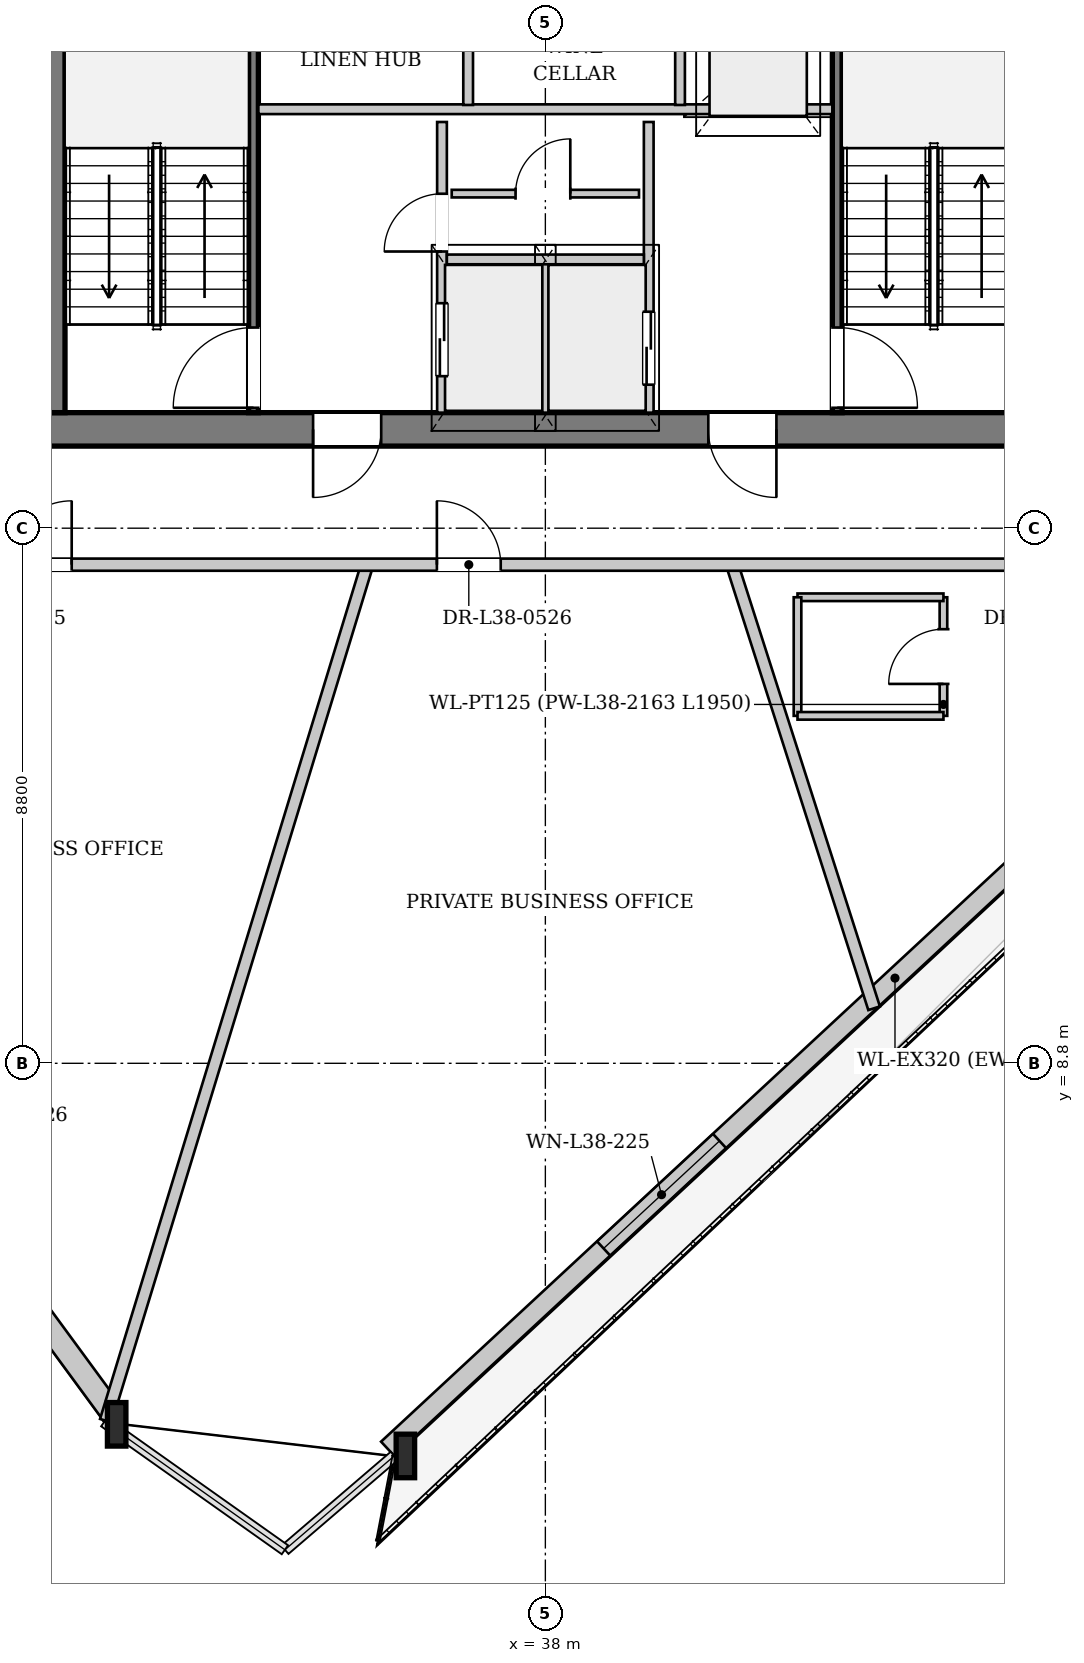
"""IFC4 building model, lengths in metres.
Left out: names, types, materials, properties, quantities, classifications, styles, units other than length and angle.
Written with IfcOpenShell. Run it as: python <this file> out.ifc"""

import sys

from ifc_helpers import new_model, si_unit, direction, frame, frame_2d, origin, origin_2d, place, context, subcontext, project, spatial, rectangle, i_section, extrude, source, transform, mapped, element, fill, save


model = new_model("IFC4")
c1 = context("Model", 3, precision=1e-05, world=origin(), true_north=direction((0.0, 1.0)))
c2 = subcontext(c1, "Body", "Model", "MODEL_VIEW")
j1 = project(units=[si_unit("LENGTHUNIT", "METRE"), si_unit("PLANEANGLEUNIT", "RADIAN")], contexts=[c1])
p1 = place(None, origin())
s1 = spatial("IfcSite", under=j1, at=p1, CompositionType="ELEMENT")
p2 = place(p1, origin())
s2 = spatial("IfcBuilding", under=s1, at=p2, CompositionType="ELEMENT")
p3 = place(p2, frame((0.0, 0.0, 146.6)))
s3 = spatial("IfcBuildingStorey", under=s2, at=p3, CompositionType="ELEMENT", Elevation=146.6)
m1 = source(origin(), c2, "Body", "SweptSolid", [
    extrude(i_section(OverallWidth=0.304, OverallDepth=0.716, WebThickness=0.021, FlangeThickness=0.04, at=origin_2d()), origin(), (0.0, 0.0, 1.0), 3.41),
])
p4 = place(p3, frame((30.746, 2.904, 0.0), z_axis=(0.119337187933, -0.023838802389, 0.992567552904), x_axis=(0.195889876884, 0.980625900196, 0.0)))
e1 = element("IfcColumn", 1, at=p4, inside=s3, PredefinedType="COLUMN", context=c2, shape_type="MappedRepresentation", body=[
    mapped(m1, transform((0.0, 0.0, 0.0), x_axis=(1.0, 0.0, 0.0), y_axis=(0.0, 1.0, 0.0), z_axis=(0.0, 0.0, 1.0), scale=1.0)),
])
m2 = source(origin(), c2, "Body", "SweptSolid", [
    extrude(i_section(OverallWidth=0.304, OverallDepth=0.716, WebThickness=0.021, FlangeThickness=0.04, at=origin_2d()), origin(), (0.0, 0.0, 1.0), 3.405),
])
p5 = place(p3, frame((35.516, 2.344, 0.0), z_axis=(0.107062289558, -0.000286838016, 0.994252273761), x_axis=(0.002679159842, 0.999996411045, 0.0)))
e2 = element("IfcColumn", 2, at=p5, inside=s3, PredefinedType="COLUMN", context=c2, shape_type="MappedRepresentation", body=[
    mapped(m2, transform((0.0, 0.0, 0.0), x_axis=(1.0, 0.0, 0.0), y_axis=(0.0, 1.0, 0.0), z_axis=(0.0, 0.0, 1.0), scale=1.0)),
])
p6 = place(p3, frame((52.73, 18.532, 0.0), z_axis=(0.0, 0.0, 1.0), x_axis=(-0.73309626957, -0.680124885255, 0.0)))
e3 = element("IfcWall", 3, at=p6, inside=s3, PredefinedType="SOLIDWALL", context=c2, shape_type="SweptSolid", body=[
    extrude(rectangle(XDim=23.63, YDim=0.32, at=frame_2d((11.815, 0.0))), origin(), (0.0, 0.0, 1.0), 2.692),
])
p7 = place(p6, frame((6.812, 0.0, 0.0)))
e4 = element("IfcOpeningElement", 4, at=p7, cuts=e3, PredefinedType="OPENING", context=c2, shape_type="SweptSolid", body=[
    extrude(rectangle(XDim=1.5, YDim=2.3, at=frame_2d((0.75, 1.15))), frame((0.0, 0.17, 0.0), z_axis=(0.0, -1.0, 0.0), x_axis=(1.0, 0.0, 0.0)), (0.0, 0.0, 1.0), 0.34),
])
p8 = place(p6, frame((16.186, 0.0, 0.25)))
e5 = element("IfcOpeningElement", 5, at=p8, cuts=e3, PredefinedType="OPENING", context=c2, shape_type="SweptSolid", body=[
    extrude(rectangle(XDim=2.6, YDim=2.35, at=frame_2d((1.3, 1.175))), frame((0.0, 0.17, 0.0), z_axis=(0.0, -1.0, 0.0), x_axis=(1.0, 0.0, 0.0)), (0.0, 0.0, 1.0), 0.34),
])
p9 = place(p3, frame((30.899, 3.016, 0.0), z_axis=(0.0, 0.0, 1.0), x_axis=(-0.591609379136, 0.806224746903, 0.0)))
e6 = element("IfcWall", 6, at=p9, inside=s3, PredefinedType="SOLIDWALL", context=c2, shape_type="SweptSolid", body=[
    extrude(rectangle(XDim=18.003, YDim=0.38, at=frame_2d((9.001, 0.0))), origin(), (0.0, 0.0, 1.0), 2.692),
])
p10 = place(p9, frame((3.941, 0.0, 0.322)))
e7 = element("IfcOpeningElement", 7, at=p10, cuts=e6, PredefinedType="OPENING", context=c2, shape_type="SweptSolid", body=[
    extrude(rectangle(XDim=2.2, YDim=2.25, at=frame_2d((1.1, 1.125))), frame((0.0, 0.2, 0.0), z_axis=(0.0, -1.0, 0.0), x_axis=(1.0, 0.0, 0.0)), (0.0, 0.0, 1.0), 0.4),
])
p11 = place(p9, frame((10.762, 0.0, 0.322)))
e8 = element("IfcOpeningElement", 8, at=p11, cuts=e6, PredefinedType="OPENING", context=c2, shape_type="SweptSolid", body=[
    extrude(rectangle(XDim=2.2, YDim=2.25, at=frame_2d((1.1, 1.125))), frame((0.0, 0.2, 0.0), z_axis=(0.0, -1.0, 0.0), x_axis=(1.0, 0.0, 0.0)), (0.0, 0.0, 1.0), 0.4),
])
p12 = place(p3, frame((46.45, 19.225, 0.0), z_axis=(0.0, 0.0, 1.0), x_axis=(-1.0, 0.0, 0.0)))
e9 = element("IfcWall", 9, at=p12, inside=s3, PredefinedType="SHEAR", context=c2, shape_type="SweptSolid", body=[
    extrude(rectangle(XDim=16.9, YDim=0.55, at=frame_2d((8.45, 0.0))), origin(), (0.0, 0.0, 1.0), 3.3),
])
p13 = place(p12, frame((4.65, 0.0, 0.0)))
e10 = element("IfcOpeningElement", 10, at=p13, cuts=e9, PredefinedType="OPENING", context=c2, shape_type="SweptSolid", body=[
    extrude(rectangle(XDim=1.12, YDim=2.25, at=frame_2d((0.56, 1.125))), frame((0.0, 0.285, 0.0), z_axis=(0.0, -1.0, 0.0), x_axis=(1.0, 0.0, 0.0)), (0.0, 0.0, 1.0), 0.57),
])
p14 = place(p12, frame((11.15, 0.0, 0.0)))
e11 = element("IfcOpeningElement", 11, at=p14, cuts=e9, PredefinedType="OPENING", context=c2, shape_type="SweptSolid", body=[
    extrude(rectangle(XDim=1.12, YDim=2.25, at=frame_2d((0.56, 1.125))), frame((0.0, 0.285, 0.0), z_axis=(0.0, -1.0, 0.0), x_axis=(1.0, 0.0, 0.0)), (0.0, 0.0, 1.0), 0.57),
])
p15 = place(p3, frame((29.825, 19.5, 0.0), z_axis=(0.0, 0.0, 1.0), x_axis=(0.0, 1.0, 0.0)))
e12 = element("IfcWall", 12, at=p15, inside=s3, PredefinedType="SHEAR", context=c2, shape_type="SweptSolid", body=[
    extrude(rectangle(XDim=14.2, YDim=0.55, at=frame_2d((7.1, 0.0))), origin(), (0.0, 0.0, 1.0), 3.3),
])
p16 = place(p15, frame((7.42, 0.0, 0.0)))
e13 = element("IfcOpeningElement", 13, at=p16, cuts=e12, PredefinedType="OPENING", context=c2, shape_type="SweptSolid", body=[
    extrude(rectangle(XDim=1.6, YDim=2.2, at=frame_2d((0.8, 1.1))), frame((0.0, 0.285, 0.0), z_axis=(0.0, -1.0, 0.0), x_axis=(1.0, 0.0, 0.0)), (0.0, 0.0, 1.0), 0.57),
])
p17 = place(p3, frame((33.2, 19.5, 0.0), z_axis=(0.0, 0.0, 1.0), x_axis=(0.0, 1.0, 0.0)))
e14 = element("IfcWall", 14, at=p17, inside=s3, PredefinedType="PARTITIONING", context=c2, shape_type="SweptSolid", body=[
    extrude(rectangle(XDim=7.46, YDim=0.16, at=frame_2d((3.73, 0.0))), origin(), (0.0, 0.0, 1.0), 3.3),
])
p18 = place(p17, frame((0.08, 0.0, 0.0)))
e15 = element("IfcOpeningElement", 15, at=p18, cuts=e14, PredefinedType="OPENING", context=c2, shape_type="SweptSolid", body=[
    extrude(rectangle(XDim=1.32, YDim=2.2, at=frame_2d((0.66, 1.1))), frame((0.0, 0.09, 0.0), z_axis=(0.0, -1.0, 0.0), x_axis=(1.0, 0.0, 0.0)), (0.0, 0.0, 1.0), 0.18),
])
p19 = place(p3, frame((42.8, 26.96, 0.0), z_axis=(0.0, 0.0, 1.0), x_axis=(0.0, -1.0, 0.0)))
e16 = element("IfcWall", 16, at=p19, inside=s3, PredefinedType="PARTITIONING", context=c2, shape_type="SweptSolid", body=[
    extrude(rectangle(XDim=7.46, YDim=0.16, at=frame_2d((3.73, 0.0))), origin(), (0.0, 0.0, 1.0), 3.3),
])
p20 = place(p19, frame((6.06, 0.0, 0.0)))
e17 = element("IfcOpeningElement", 17, at=p20, cuts=e16, PredefinedType="OPENING", context=c2, shape_type="SweptSolid", body=[
    extrude(rectangle(XDim=1.32, YDim=2.2, at=frame_2d((0.66, 1.1))), frame((0.0, 0.09, 0.0), z_axis=(0.0, -1.0, 0.0), x_axis=(1.0, 0.0, 0.0)), (0.0, 0.0, 1.0), 0.18),
])
p21 = place(p3, frame((36.3, 19.5, 0.0), z_axis=(0.0, 0.0, 1.0), x_axis=(0.0, 1.0, 0.0)))
e18 = element("IfcWall", 18, at=p21, inside=s3, PredefinedType="PARTITIONING", context=c2, shape_type="SweptSolid", body=[
    extrude(rectangle(XDim=4.78, YDim=0.16, at=frame_2d((2.39, 0.0))), origin(), (0.0, 0.0, 1.0), 3.3),
])
p22 = place(p21, frame((0.6, 0.0, 0.0)))
e19 = element("IfcOpeningElement", 19, at=p22, cuts=e18, PredefinedType="OPENING", context=c2, shape_type="SweptSolid", body=[
    extrude(rectangle(XDim=1.2, YDim=2.2, at=frame_2d((0.6, 1.1))), frame((0.0, 0.09, 0.0), z_axis=(0.0, -1.0, 0.0), x_axis=(1.0, 0.0, 0.0)), (0.0, 0.0, 1.0), 0.18),
])
p23 = place(p21, frame((2.65, 0.0, 0.0)))
e20 = element("IfcOpeningElement", 20, at=p23, cuts=e18, PredefinedType="OPENING", context=c2, shape_type="SweptSolid", body=[
    extrude(rectangle(XDim=0.95, YDim=2.1, at=frame_2d((0.475, 1.05))), frame((0.0, 0.09, 0.0), z_axis=(0.0, -1.0, 0.0), x_axis=(1.0, 0.0, 0.0)), (0.0, 0.0, 1.0), 0.18),
])
p24 = place(p3, frame((39.7, 24.28, 0.0), z_axis=(0.0, 0.0, 1.0), x_axis=(0.0, -1.0, 0.0)))
e21 = element("IfcWall", 21, at=p24, inside=s3, PredefinedType="PARTITIONING", context=c2, shape_type="SweptSolid", body=[
    extrude(rectangle(XDim=4.78, YDim=0.16, at=frame_2d((2.39, 0.0))), origin(), (0.0, 0.0, 1.0), 3.3),
])
p25 = place(p24, frame((3.12, 0.0, 0.0)))
e22 = element("IfcOpeningElement", 22, at=p25, cuts=e21, PredefinedType="OPENING", context=c2, shape_type="SweptSolid", body=[
    extrude(rectangle(XDim=1.2, YDim=2.2, at=frame_2d((0.6, 1.1))), frame((0.0, 0.09, 0.0), z_axis=(0.0, -1.0, 0.0), x_axis=(1.0, 0.0, 0.0)), (0.0, 0.0, 1.0), 0.18),
])
p26 = place(p3, frame((38.0, 19.5, 0.0), z_axis=(0.0, 0.0, 1.0), x_axis=(0.0, 1.0, 0.0)))
e23 = element("IfcWall", 23, at=p26, inside=s3, PredefinedType="PARTITIONING", context=c2, shape_type="SweptSolid", body=[
    extrude(rectangle(XDim=2.46, YDim=0.125, at=frame_2d((1.23, 0.0))), origin(), (0.0, 0.0, 1.0), 3.3),
])
p27 = place(p3, frame((36.38, 22.02, 0.0), z_axis=(0.0, 0.0, 1.0), x_axis=(1.0, 0.0, 0.0)))
e24 = element("IfcWall", 24, at=p27, inside=s3, PredefinedType="PARTITIONING", context=c2, shape_type="SweptSolid", body=[
    extrude(rectangle(XDim=3.24, YDim=0.16, at=frame_2d((1.62, 0.0))), origin(), (0.0, 0.0, 1.0), 3.3),
])
p28 = place(p3, frame((33.28, 24.49, 0.0), z_axis=(0.0, 0.0, 1.0), x_axis=(1.0, 0.0, 0.0)))
e25 = element("IfcWall", 25, at=p28, inside=s3, PredefinedType="PARTITIONING", context=c2, shape_type="SweptSolid", body=[
    extrude(rectangle(XDim=9.44, YDim=0.16, at=frame_2d((4.72, 0.0))), origin(), (0.0, 0.0, 1.0), 3.3),
])
p29 = place(p3, frame((36.46, 23.102, 0.0), z_axis=(0.0, 0.0, 1.0), x_axis=(1.0, 0.0, 0.0)))
e26 = element("IfcWall", 26, at=p29, inside=s3, PredefinedType="PARTITIONING", context=c2, shape_type="SweptSolid", body=[
    extrude(rectangle(XDim=3.08, YDim=0.125, at=frame_2d((1.54, 0.0))), origin(), (0.0, 0.0, 1.0), 3.3),
])
p30 = place(p29, frame((1.05, 0.0, 0.0)))
e27 = element("IfcOpeningElement", 27, at=p30, cuts=e26, PredefinedType="OPENING", context=c2, shape_type="SweptSolid", body=[
    extrude(rectangle(XDim=0.9, YDim=2.1, at=frame_2d((0.45, 1.05))), frame((0.0, 0.073, 0.0), z_axis=(0.0, -1.0, 0.0), x_axis=(1.0, 0.0, 0.0)), (0.0, 0.0, 1.0), 0.145),
])
for number, where, z_axis, x_axis in (
    (28, (36.73, 24.56, 0.0), (0.0, 0.0, 1.0), (0.0, 1.0, 0.0)),
    (29, (40.215, 24.56, 0.0), (0.0, 0.0, 1.0), (0.0, 1.0, 0.0)),
):
    element("IfcWall", number, at=place(p3, frame(where, z_axis=z_axis, x_axis=x_axis)), inside=s3, PredefinedType="PARTITIONING", context=c2, shape_type="SweptSolid", body=[
        extrude(rectangle(XDim=2.31, YDim=0.16, at=frame_2d((1.155, 0.0))), origin(), (0.0, 0.0, 1.0), 3.3),
    ])
p31 = place(p3, frame((35.07, 17.0, 0.0), z_axis=(0.0, 0.0, 1.0), x_axis=(-0.29195683842, -0.956431494933, 0.0)))
e30 = element("IfcWall", 30, at=p31, inside=s3, PredefinedType="PARTITIONING", context=c2, shape_type="SweptSolid", body=[
    extrude(rectangle(XDim=14.719, YDim=0.2, at=frame_2d((7.36, 0.0))), origin(), (0.0, 0.0, 1.0), 2.895),
])
p32 = place(p3, frame((41.072, 17.0, 0.0), z_axis=(0.0, 0.0, 1.0), x_axis=(0.304787292701, -0.952420446131, 0.0)))
e31 = element("IfcWall", 31, at=p32, inside=s3, PredefinedType="PARTITIONING", context=c2, shape_type="SweptSolid", body=[
    extrude(rectangle(XDim=7.659, YDim=0.2, at=frame_2d((3.83, 0.0))), origin(), (0.0, 0.0, 1.0), 3.3),
])
p33 = place(p3, frame((44.547, 14.514, 0.0), z_axis=(0.0, 0.0, 1.0), x_axis=(0.0, 1.0, 0.0)))
e32 = element("IfcWall", 32, at=p33, inside=s3, PredefinedType="PARTITIONING", context=c2, shape_type="SweptSolid", body=[
    extrude(rectangle(XDim=1.95, YDim=0.125, at=frame_2d((0.975, 0.0))), origin(), (0.0, 0.0, 1.0), 3.3),
])
p34 = place(p33, frame((0.525, 0.0, 0.0)))
e33 = element("IfcOpeningElement", 33, at=p34, cuts=e32, PredefinedType="OPENING", context=c2, shape_type="SweptSolid", body=[
    extrude(rectangle(XDim=0.9, YDim=2.1, at=frame_2d((0.45, 1.05))), frame((0.0, 0.073, 0.0), z_axis=(0.0, -1.0, 0.0), x_axis=(1.0, 0.0, 0.0)), (0.0, 0.0, 1.0), 0.145),
])
p35 = place(p3, frame((44.547, 16.464, 0.0), z_axis=(0.0, 0.0, 1.0), x_axis=(-1.0, 0.0, 0.0)))
e34 = element("IfcWall", 34, at=p35, inside=s3, PredefinedType="PARTITIONING", context=c2, shape_type="SweptSolid", body=[
    extrude(rectangle(XDim=2.4, YDim=0.125, at=frame_2d((1.2, 0.0))), origin(), (0.0, 0.0, 1.0), 3.3),
])
p36 = place(p3, frame((42.147, 16.464, 0.0), z_axis=(0.0, 0.0, 1.0), x_axis=(0.0, -1.0, 0.0)))
e35 = element("IfcWall", 35, at=p36, inside=s3, PredefinedType="PARTITIONING", context=c2, shape_type="SweptSolid", body=[
    extrude(rectangle(XDim=1.95, YDim=0.125, at=frame_2d((0.975, 0.0))), origin(), (0.0, 0.0, 1.0), 3.3),
])
p37 = place(p3, frame((42.147, 14.514, 0.0), z_axis=(0.0, 0.0, 1.0), x_axis=(1.0, 0.0, 0.0)))
e36 = element("IfcWall", 36, at=p37, inside=s3, PredefinedType="PARTITIONING", context=c2, shape_type="SweptSolid", body=[
    extrude(rectangle(XDim=2.4, YDim=0.125, at=frame_2d((1.2, 0.0))), origin(), (0.0, 0.0, 1.0), 3.3),
])
p38 = place(p3, frame((27.6, 17.0, 0.0), z_axis=(0.0, 0.0, 1.0), x_axis=(1.0, 0.0, 0.0)))
e37 = element("IfcWall", 37, at=p38, inside=s3, PredefinedType="PARTITIONING", context=c2, shape_type="SweptSolid", body=[
    extrude(rectangle(XDim=20.8, YDim=0.2, at=frame_2d((10.4, 0.0))), origin(), (0.0, 0.0, 1.0), 3.3),
])
p39 = place(p38, frame((1.56, 0.0, 0.0)))
e38 = element("IfcOpeningElement", 38, at=p39, cuts=e37, PredefinedType="OPENING", context=c2, shape_type="SweptSolid", body=[
    extrude(rectangle(XDim=1.05, YDim=2.2, at=frame_2d((0.525, 1.1))), frame((0.0, 0.11, 0.0), z_axis=(0.0, -1.0, 0.0), x_axis=(1.0, 0.0, 0.0)), (0.0, 0.0, 1.0), 0.22),
])
p40 = place(p38, frame((8.616, 0.0, 0.0)))
e39 = element("IfcOpeningElement", 39, at=p40, cuts=e37, PredefinedType="OPENING", context=c2, shape_type="SweptSolid", body=[
    extrude(rectangle(XDim=1.05, YDim=2.2, at=frame_2d((0.525, 1.1))), frame((0.0, 0.11, 0.0), z_axis=(0.0, -1.0, 0.0), x_axis=(1.0, 0.0, 0.0)), (0.0, 0.0, 1.0), 0.22),
])
p41 = place(p38, frame((18.781, 0.0, 0.0)))
e40 = element("IfcOpeningElement", 40, at=p41, cuts=e37, PredefinedType="OPENING", context=c2, shape_type="SweptSolid", body=[
    extrude(rectangle(XDim=1.05, YDim=2.2, at=frame_2d((0.525, 1.1))), frame((0.0, 0.11, 0.0), z_axis=(0.0, -1.0, 0.0), x_axis=(1.0, 0.0, 0.0)), (0.0, 0.0, 1.0), 0.22),
])
m3 = source(origin(), c2, "Body", "SweptSolid", [
    extrude(rectangle(XDim=2.6, YDim=2.35, at=frame_2d((1.3, 1.175))), frame((0.0, 0.03, 0.0), z_axis=(0.0, -1.0, 0.0), x_axis=(1.0, 0.0, 0.0)), (0.0, 0.0, 1.0), 0.06),
])
p42 = place(p8, origin())
e41 = element("IfcWindow", 41, at=p42, inside=s3, PartitioningType="SINGLE_PANEL", PredefinedType="WINDOW", context=c2, shape_type="MappedRepresentation", body=[
    mapped(m3, transform((0.0, 0.0, 0.0), x_axis=(1.0, 0.0, 0.0), y_axis=(0.0, 1.0, 0.0), z_axis=(0.0, 0.0, 1.0), scale=1.0)),
])
fill(e5, e41)
m4 = source(origin(), c2, "Body", "SweptSolid", [
    extrude(rectangle(XDim=1.12, YDim=2.25, at=frame_2d((0.56, 1.125))), frame((0.0, 0.025, 0.0), z_axis=(0.0, -1.0, 0.0), x_axis=(1.0, 0.0, 0.0)), (0.0, 0.0, 1.0), 0.05),
])
p43 = place(p13, origin())
e42 = element("IfcDoor", 42, at=p43, inside=s3, OperationType="SINGLE_SWING_LEFT", PredefinedType="DOOR", context=c2, shape_type="MappedRepresentation", body=[
    mapped(m4, transform((0.0, 0.0, 0.0), x_axis=(1.0, 0.0, 0.0), y_axis=(0.0, 1.0, 0.0), z_axis=(0.0, 0.0, 1.0), scale=1.0)),
])
fill(e10, e42)
p44 = place(p14, origin())
e43 = element("IfcDoor", 43, at=p44, inside=s3, OperationType="SINGLE_SWING_RIGHT", PredefinedType="DOOR", context=c2, shape_type="MappedRepresentation", body=[
    mapped(m4, transform((0.0, 0.0, 0.0), x_axis=(1.0, 0.0, 0.0), y_axis=(0.0, 1.0, 0.0), z_axis=(0.0, 0.0, 1.0), scale=1.0)),
])
fill(e11, e43)
m5 = source(origin(), c2, "Body", "SweptSolid", [
    extrude(rectangle(XDim=1.32, YDim=2.2, at=frame_2d((0.66, 1.1))), frame((0.0, 0.025, 0.0), z_axis=(0.0, -1.0, 0.0), x_axis=(1.0, 0.0, 0.0)), (0.0, 0.0, 1.0), 0.05),
])
p45 = place(p18, origin())
e44 = element("IfcDoor", 44, at=p45, inside=s3, OperationType="SINGLE_SWING_LEFT", PredefinedType="DOOR", context=c2, shape_type="MappedRepresentation", body=[
    mapped(m5, transform((0.0, 0.0, 0.0), x_axis=(1.0, 0.0, 0.0), y_axis=(0.0, 1.0, 0.0), z_axis=(0.0, 0.0, 1.0), scale=1.0)),
])
fill(e15, e44)
p46 = place(p20, origin())
e45 = element("IfcDoor", 45, at=p46, inside=s3, OperationType="SINGLE_SWING_RIGHT", PredefinedType="DOOR", context=c2, shape_type="MappedRepresentation", body=[
    mapped(m5, transform((0.0, 0.0, 0.0), x_axis=(1.0, 0.0, 0.0), y_axis=(0.0, 1.0, 0.0), z_axis=(0.0, 0.0, 1.0), scale=1.0)),
])
fill(e17, e45)
m6 = source(origin(), c2, "Body", "SweptSolid", [
    extrude(rectangle(XDim=1.2, YDim=2.2, at=frame_2d((0.6, 1.1))), frame((0.0, 0.025, 0.0), z_axis=(0.0, -1.0, 0.0), x_axis=(1.0, 0.0, 0.0)), (0.0, 0.0, 1.0), 0.05),
])
p47 = place(p22, origin())
e46 = element("IfcDoor", 46, at=p47, inside=s3, OperationType="DOUBLE_DOOR_SLIDING", PredefinedType="DOOR", context=c2, shape_type="MappedRepresentation", body=[
    mapped(m6, transform((0.0, 0.0, 0.0), x_axis=(1.0, 0.0, 0.0), y_axis=(0.0, 1.0, 0.0), z_axis=(0.0, 0.0, 1.0), scale=1.0)),
])
fill(e19, e46)
m7 = source(origin(), c2, "Body", "SweptSolid", [
    extrude(rectangle(XDim=0.95, YDim=2.1, at=frame_2d((0.475, 1.05))), frame((0.0, 0.025, 0.0), z_axis=(0.0, -1.0, 0.0), x_axis=(1.0, 0.0, 0.0)), (0.0, 0.0, 1.0), 0.05),
])
p48 = place(p23, origin())
e47 = element("IfcDoor", 47, at=p48, inside=s3, OperationType="SINGLE_SWING_LEFT", PredefinedType="DOOR", context=c2, shape_type="MappedRepresentation", body=[
    mapped(m7, transform((0.0, 0.0, 0.0), x_axis=(1.0, 0.0, 0.0), y_axis=(0.0, 1.0, 0.0), z_axis=(0.0, 0.0, 1.0), scale=1.0)),
])
fill(e20, e47)
m8 = source(origin(), c2, "Body", "SweptSolid", [
    extrude(rectangle(XDim=0.9, YDim=2.1, at=frame_2d((0.45, 1.05))), frame((0.0, 0.025, 0.0), z_axis=(0.0, -1.0, 0.0), x_axis=(1.0, 0.0, 0.0)), (0.0, 0.0, 1.0), 0.05),
])
p49 = place(p30, origin())
e48 = element("IfcDoor", 48, at=p49, inside=s3, OperationType="SINGLE_SWING_RIGHT", PredefinedType="DOOR", context=c2, shape_type="MappedRepresentation", body=[
    mapped(m8, transform((0.0, 0.0, 0.0), x_axis=(1.0, 0.0, 0.0), y_axis=(0.0, 1.0, 0.0), z_axis=(0.0, 0.0, 1.0), scale=1.0)),
])
fill(e27, e48)
p50 = place(p25, origin())
e49 = element("IfcDoor", 49, at=p50, inside=s3, OperationType="DOUBLE_DOOR_SLIDING", PredefinedType="DOOR", context=c2, shape_type="MappedRepresentation", body=[
    mapped(m6, transform((0.0, 0.0, 0.0), x_axis=(1.0, 0.0, 0.0), y_axis=(0.0, 1.0, 0.0), z_axis=(0.0, 0.0, 1.0), scale=1.0)),
])
fill(e22, e49)
p51 = place(p34, origin())
e50 = element("IfcDoor", 50, at=p51, inside=s3, OperationType="SINGLE_SWING_LEFT", PredefinedType="DOOR", context=c2, shape_type="MappedRepresentation", body=[
    mapped(m8, transform((0.0, 0.0, 0.0), x_axis=(1.0, 0.0, 0.0), y_axis=(0.0, 1.0, 0.0), z_axis=(0.0, 0.0, 1.0), scale=1.0)),
])
fill(e33, e50)
m9 = source(origin(), c2, "Body", "SweptSolid", [
    extrude(rectangle(XDim=1.05, YDim=2.2, at=frame_2d((0.525, 1.1))), frame((0.0, 0.025, 0.0), z_axis=(0.0, -1.0, 0.0), x_axis=(1.0, 0.0, 0.0)), (0.0, 0.0, 1.0), 0.05),
])
p52 = place(p39, origin())
e51 = element("IfcDoor", 51, at=p52, inside=s3, OperationType="SINGLE_SWING_RIGHT", PredefinedType="DOOR", context=c2, shape_type="MappedRepresentation", body=[
    mapped(m9, transform((0.0, 0.0, 0.0), x_axis=(1.0, 0.0, 0.0), y_axis=(0.0, 1.0, 0.0), z_axis=(0.0, 0.0, 1.0), scale=1.0)),
])
fill(e38, e51)
p53 = place(p40, origin())
e52 = element("IfcDoor", 52, at=p53, inside=s3, OperationType="SINGLE_SWING_LEFT", PredefinedType="DOOR", context=c2, shape_type="MappedRepresentation", body=[
    mapped(m9, transform((0.0, 0.0, 0.0), x_axis=(1.0, 0.0, 0.0), y_axis=(0.0, 1.0, 0.0), z_axis=(0.0, 0.0, 1.0), scale=1.0)),
])
fill(e39, e52)
save(model, sys.argv[1])
